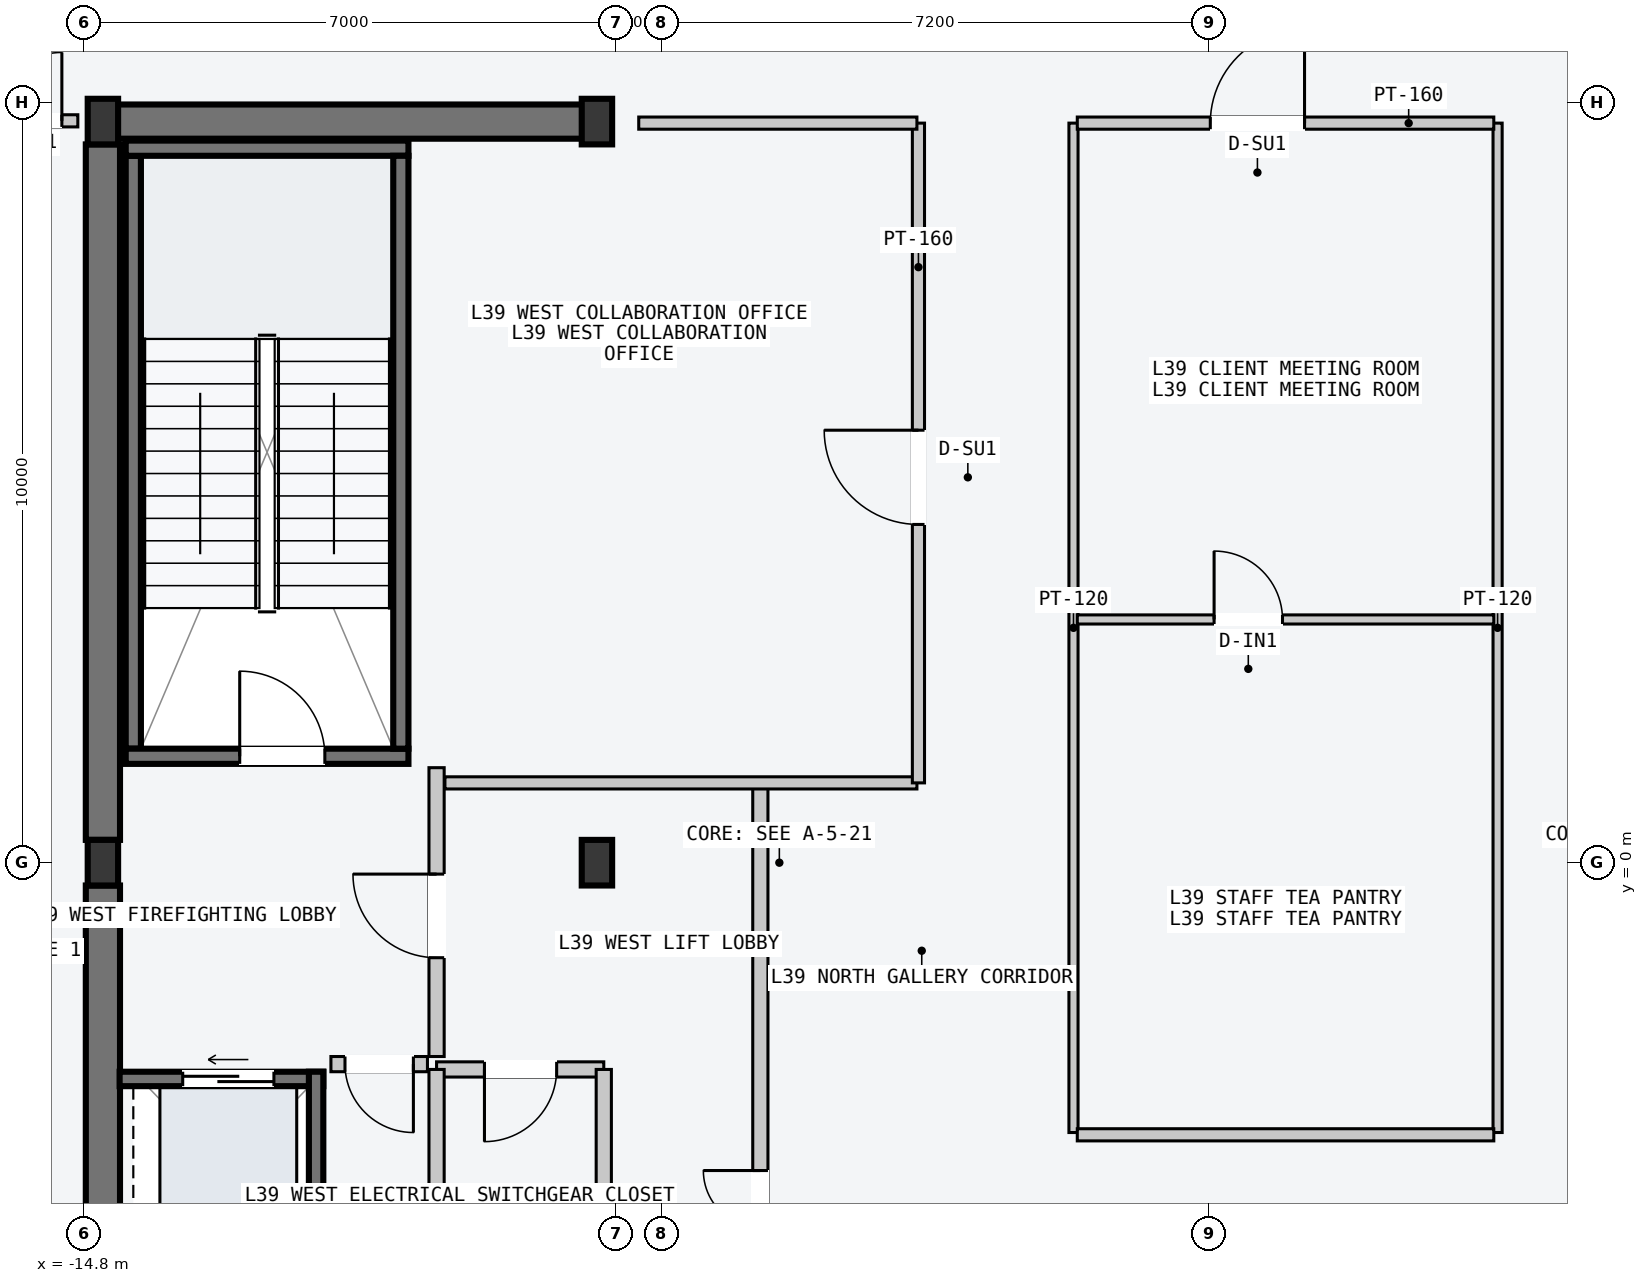
"""IFC4 building model, lengths in metres.
Left out: names, types, materials, properties, quantities, classifications, styles, units other than length and angle.
Written with IfcOpenShell. Run it as: python <this file> out.ifc"""

import sys

from ifc_helpers import new_model, si_unit, direction, frame, frame_2d, origin, origin_2d, place, context, subcontext, project, spatial, rectangle, i_section, extrude, element, fill, save


model = new_model("IFC4")
c1 = context("Model", 3, precision=1e-05, world=origin(), true_north=direction((0.0, 1.0)))
c2 = subcontext(c1, "Body", "Model", "MODEL_VIEW")
j1 = project(units=[si_unit("LENGTHUNIT", "METRE"), si_unit("PLANEANGLEUNIT", "RADIAN")], contexts=[c1])
p1 = place(None, origin())
s1 = spatial("IfcSite", under=j1, at=p1, CompositionType="ELEMENT")
p2 = place(p1, origin())
s2 = spatial("IfcBuilding", under=s1, at=p2, CompositionType="ELEMENT")
p3 = place(p2, frame((0.0, 0.0, 150.6)))
s3 = spatial("IfcBuildingStorey", under=s2, at=p3, CompositionType="ELEMENT", Elevation=150.6)
p4 = place(p3, frame((-14.53, 9.75, -0.2), z_axis=(0.0, 0.0, 1.0), x_axis=(1.0, 0.0, 0.0)))
e1 = element("IfcWall", 1, at=p4, inside=s3, PredefinedType="SHEAR", context=c2, shape_type="SweptSolid", body=[
    extrude(rectangle(XDim=6.46, YDim=0.45, at=frame_2d((3.23, 0.0))), origin(), (0.0, 0.0, 1.0), 4.5),
])
for number, where, z_axis, x_axis in (
    (2, (-14.55, -9.45, -0.2), (0.0, 0.0, 1.0), (0.0, 1.0, 0.0)),
    (3, (-14.55, 0.3, -0.2), (0.0, 0.0, 1.0), (0.0, 1.0, 0.0)),
):
    element("IfcWall", number, at=place(p3, frame(where, z_axis=z_axis, x_axis=x_axis)), inside=s3, PredefinedType="SHEAR", context=c2, shape_type="SweptSolid", body=[
        extrude(rectangle(XDim=9.15, YDim=0.45, at=frame_2d((4.575, 0.0))), origin(), (0.0, 0.0, 1.0), 4.5),
    ])
p5 = place(p3, frame((-14.15, 1.5, -0.2), z_axis=(0.0, 0.0, 1.0), x_axis=(0.0, 1.0, 0.0)))
e4 = element("IfcWall", 4, at=p5, inside=s3, PredefinedType="SOLIDWALL", context=c2, shape_type="SweptSolid", body=[
    extrude(rectangle(XDim=7.8, YDim=0.2, at=frame_2d((3.9, 0.0))), origin(), (0.0, 0.0, 1.0), 4.5),
])
p6 = place(p3, frame((-14.25, 1.4, -0.2), z_axis=(0.0, 0.0, 1.0), x_axis=(1.0, 0.0, 0.0)))
e5 = element("IfcWall", 5, at=p6, inside=s3, PredefinedType="SOLIDWALL", context=c2, shape_type="SweptSolid", body=[
    extrude(rectangle(XDim=3.72, YDim=0.2, at=frame_2d((1.86, 0.0))), origin(), (0.0, 0.0, 1.0), 4.5),
])
p7 = place(p6, frame((1.5, 0.0, 0.2)))
e6 = element("IfcOpeningElement", 6, at=p7, cuts=e5, PredefinedType="OPENING", context=c2, shape_type="SweptSolid", body=[
    extrude(rectangle(XDim=1.12, YDim=2.18, at=frame_2d((0.56, 1.09))), frame((0.0, 0.11, 0.0), z_axis=(0.0, -1.0, 0.0), x_axis=(1.0, 0.0, 0.0)), (0.0, 0.0, 1.0), 0.22),
])
p8 = place(p3, frame((-14.25, 9.4, -0.2), z_axis=(0.0, 0.0, 1.0), x_axis=(1.0, 0.0, 0.0)))
e7 = element("IfcWall", 7, at=p8, inside=s3, PredefinedType="SOLIDWALL", context=c2, shape_type="SweptSolid", body=[
    extrude(rectangle(XDim=3.72, YDim=0.2, at=frame_2d((1.86, 0.0))), origin(), (0.0, 0.0, 1.0), 4.5),
])
p9 = place(p3, frame((-10.63, 1.5, -0.2), z_axis=(0.0, 0.0, 1.0), x_axis=(0.0, 1.0, 0.0)))
e8 = element("IfcWall", 8, at=p9, inside=s3, PredefinedType="SOLIDWALL", context=c2, shape_type="SweptSolid", body=[
    extrude(rectangle(XDim=7.8, YDim=0.2, at=frame_2d((3.9, 0.0))), origin(), (0.0, 0.0, 1.0), 4.5),
])
for number, where, z_axis, x_axis in (
    (9, (-14.55, 0.0, 0.0), (0.0, 0.0, 1.0), (1.0, 0.0, 0.0)),
    (10, (-14.55, 9.75, 0.0), (0.0, 0.0, 1.0), (1.0, 0.0, 0.0)),
    (11, (-8.05, 0.0, 0.0), (0.0, 0.0, 1.0), (1.0, 0.0, 0.0)),
    (12, (-8.05, 9.75, 0.0), (0.0, 0.0, 1.0), (1.0, 0.0, 0.0)),
):
    element("IfcColumn", number, at=place(p3, frame(where, z_axis=z_axis, x_axis=x_axis)), inside=s3, PredefinedType="COLUMN", context=c2, shape_type="SweptSolid", body=[
        extrude(i_section(OverallWidth=0.4, OverallDepth=0.6, WebThickness=0.022, FlangeThickness=0.036, at=origin_2d()), origin(), (0.0, 0.0, 1.0), 4.5),
    ])
p10 = place(p3, frame((-14.33, -2.845, -0.2), z_axis=(0.0, 0.0, 1.0), x_axis=(1.0, 0.0, 0.0)))
e13 = element("IfcWall", 13, at=p10, inside=s3, PredefinedType="SOLIDWALL", context=c2, shape_type="SweptSolid", body=[
    extrude(rectangle(XDim=2.68, YDim=0.19, at=frame_2d((1.34, 0.0))), origin(), (0.0, 0.0, 1.0), 4.5),
])
p11 = place(p10, frame((0.83, 0.0, 0.2)))
e14 = element("IfcOpeningElement", 14, at=p11, cuts=e13, PredefinedType="OPENING", context=c2, shape_type="SweptSolid", body=[
    extrude(rectangle(XDim=1.2, YDim=2.2, at=frame_2d((0.6, 1.1))), frame((0.0, 0.105, 0.0), z_axis=(0.0, -1.0, 0.0), x_axis=(1.0, 0.0, 0.0)), (0.0, 0.0, 1.0), 0.21),
])
p12 = place(p3, frame((-11.745, -5.35, -0.2), z_axis=(0.0, 0.0, 1.0), x_axis=(0.0, 1.0, 0.0)))
e15 = element("IfcWall", 15, at=p12, inside=s3, PredefinedType="SOLIDWALL", context=c2, shape_type="SweptSolid", body=[
    extrude(rectangle(XDim=2.6, YDim=0.19, at=frame_2d((1.3, 0.0))), origin(), (0.0, 0.0, 1.0), 4.5),
])
p13 = place(p3, frame((-5.9, -9.45, 0.0), z_axis=(0.0, 0.0, 1.0), x_axis=(0.0, 1.0, 0.0)))
e16 = element("IfcWall", 16, at=p13, inside=s3, PredefinedType="PARTITIONING", context=c2, shape_type="SweptSolid", body=[
    extrude(rectangle(XDim=10.5, YDim=0.2, at=frame_2d((5.25, 0.0))), origin(), (0.0, 0.0, 1.0), 4.3),
])
p14 = place(p13, frame((3.9, 0.0, 0.0)))
e17 = element("IfcOpeningElement", 17, at=p14, cuts=e16, PredefinedType="OPENING", context=c2, shape_type="SweptSolid", body=[
    extrude(rectangle(XDim=1.5, YDim=2.2, at=frame_2d((0.75, 1.1))), frame((0.0, 0.11, 0.0), z_axis=(0.0, -1.0, 0.0), x_axis=(1.0, 0.0, 0.0)), (0.0, 0.0, 1.0), 0.22),
])
p15 = place(p3, frame((-10.16, -2.55, 0.0), z_axis=(0.0, 0.0, 1.0), x_axis=(0.0, 1.0, 0.0)))
e18 = element("IfcWall", 18, at=p15, inside=s3, PredefinedType="PARTITIONING", context=c2, shape_type="SweptSolid", body=[
    extrude(rectangle(XDim=3.8, YDim=0.2, at=frame_2d((1.9, 0.0))), origin(), (0.0, 0.0, 1.0), 4.3),
])
p16 = place(p15, frame((1.3, 0.0, 0.0)))
e19 = element("IfcOpeningElement", 19, at=p16, cuts=e18, PredefinedType="OPENING", context=c2, shape_type="SweptSolid", body=[
    extrude(rectangle(XDim=1.1, YDim=2.15, at=frame_2d((0.55, 1.075))), frame((0.0, 0.11, 0.0), z_axis=(0.0, -1.0, 0.0), x_axis=(1.0, 0.0, 0.0)), (0.0, 0.0, 1.0), 0.22),
])
p17 = place(p3, frame((-10.28, -2.65, 0.0), z_axis=(0.0, 0.0, 1.0), x_axis=(-1.0, 0.0, 0.0)))
e20 = element("IfcWall", 20, at=p17, inside=s3, PredefinedType="PARTITIONING", context=c2, shape_type="SweptSolid", body=[
    extrude(rectangle(XDim=1.27, YDim=0.2, at=frame_2d((0.635, 0.0))), origin(), (0.0, 0.0, 1.0), 4.3),
])
p18 = place(p17, frame((0.185, 0.0, 0.0)))
e21 = element("IfcOpeningElement", 21, at=p18, cuts=e20, PredefinedType="OPENING", context=c2, shape_type="SweptSolid", body=[
    extrude(rectangle(XDim=0.9, YDim=2.15, at=frame_2d((0.45, 1.075))), frame((0.0, 0.11, 0.0), z_axis=(0.0, -1.0, 0.0), x_axis=(1.0, 0.0, 0.0)), (0.0, 0.0, 1.0), 0.22),
])
p19 = place(p3, frame((-7.96, -2.72, 0.0), z_axis=(0.0, 0.0, 1.0), x_axis=(-1.0, 0.0, 0.0)))
e22 = element("IfcWall", 22, at=p19, inside=s3, PredefinedType="PARTITIONING", context=c2, shape_type="SweptSolid", body=[
    extrude(rectangle(XDim=2.2, YDim=0.2, at=frame_2d((1.1, 0.0))), origin(), (0.0, 0.0, 1.0), 4.3),
])
p20 = place(p19, frame((0.62, 0.0, 0.0)))
e23 = element("IfcOpeningElement", 23, at=p20, cuts=e22, PredefinedType="OPENING", context=c2, shape_type="SweptSolid", body=[
    extrude(rectangle(XDim=0.95, YDim=2.1, at=frame_2d((0.475, 1.05))), frame((0.0, 0.11, 0.0), z_axis=(0.0, -1.0, 0.0), x_axis=(1.0, 0.0, 0.0)), (0.0, 0.0, 1.0), 0.22),
])
for number, where, z_axis, x_axis in (
    (24, (-7.96, -5.16, 0.0), (0.0, 0.0, 1.0), (0.0, 1.0, 0.0)),
    (25, (-10.16, -5.16, 0.0), (0.0, 0.0, 1.0), (0.0, 1.0, 0.0)),
):
    element("IfcWall", number, at=place(p3, frame(where, z_axis=z_axis, x_axis=x_axis)), inside=s3, PredefinedType="PARTITIONING", context=c2, shape_type="SweptSolid", body=[
        extrude(rectangle(XDim=2.44, YDim=0.2, at=frame_2d((1.22, 0.0))), origin(), (0.0, 0.0, 1.0), 4.3),
    ])
p21 = place(p3, frame((-10.05, 1.05, 0.0), z_axis=(0.0, 0.0, 1.0), x_axis=(1.0, 0.0, 0.0)))
e26 = element("IfcWall", 26, at=p21, inside=s3, PredefinedType="PARTITIONING", context=c2, shape_type="SweptSolid", body=[
    extrude(rectangle(XDim=6.21, YDim=0.16, at=frame_2d((3.105, 0.0))), origin(), (0.0, 0.0, 1.0), 4.3),
])
p22 = place(p3, frame((-3.82, 1.05, 0.0), z_axis=(0.0, 0.0, 1.0), x_axis=(0.0, 1.0, 0.0)))
e27 = element("IfcWall", 27, at=p22, inside=s3, PredefinedType="PARTITIONING", context=c2, shape_type="SweptSolid", body=[
    extrude(rectangle(XDim=8.68, YDim=0.16, at=frame_2d((4.34, 0.0))), origin(), (0.0, 0.0, 1.0), 4.3),
])
p23 = place(p22, frame((3.4, 0.0, 0.0)))
e28 = element("IfcOpeningElement", 28, at=p23, cuts=e27, PredefinedType="OPENING", context=c2, shape_type="SweptSolid", body=[
    extrude(rectangle(XDim=1.24, YDim=2.24, at=frame_2d((0.62, 1.12))), frame((0.0, 0.09, 0.0), z_axis=(0.0, -1.0, 0.0), x_axis=(1.0, 0.0, 0.0)), (0.0, 0.0, 1.0), 0.18),
])
p24 = place(p3, frame((-7.5, 9.73, 0.0), z_axis=(0.0, 0.0, 1.0), x_axis=(1.0, 0.0, 0.0)))
e29 = element("IfcWall", 29, at=p24, inside=s3, PredefinedType="PARTITIONING", context=c2, shape_type="SweptSolid", body=[
    extrude(rectangle(XDim=3.66, YDim=0.16, at=frame_2d((1.83, 0.0))), origin(), (0.0, 0.0, 1.0), 3.6),
])
for number, where, z_axis, x_axis in (
    (30, (-1.78, -3.55, 0.0), (0.0, 0.0, 1.0), (0.0, 1.0, 0.0)),
    (31, (3.8, -3.55, 0.0), (0.0, 0.0, 1.0), (0.0, 1.0, 0.0)),
):
    element("IfcWall", number, at=place(p3, frame(where, z_axis=z_axis, x_axis=x_axis)), inside=s3, PredefinedType="PARTITIONING", context=c2, shape_type="SweptSolid", body=[
        extrude(rectangle(XDim=13.28, YDim=0.12, at=frame_2d((6.64, 0.0))), origin(), (0.0, 0.0, 1.0), 4.3),
    ])
p25 = place(p3, frame((-1.73, -3.58, 0.0), z_axis=(0.0, 0.0, 1.0), x_axis=(1.0, 0.0, 0.0)))
e32 = element("IfcWall", 32, at=p25, inside=s3, PredefinedType="PARTITIONING", context=c2, shape_type="SweptSolid", body=[
    extrude(rectangle(XDim=5.48, YDim=0.16, at=frame_2d((2.74, 0.0))), origin(), (0.0, 0.0, 1.0), 4.3),
])
p26 = place(p3, frame((-1.73, 3.2, 0.0), z_axis=(0.0, 0.0, 1.0), x_axis=(1.0, 0.0, 0.0)))
e33 = element("IfcWall", 33, at=p26, inside=s3, PredefinedType="PARTITIONING", context=c2, shape_type="SweptSolid", body=[
    extrude(rectangle(XDim=5.48, YDim=0.12, at=frame_2d((2.74, 0.0))), origin(), (0.0, 0.0, 1.0), 4.3),
])
p27 = place(p26, frame((1.8, 0.0, 0.0)))
e34 = element("IfcOpeningElement", 34, at=p27, cuts=e33, PredefinedType="OPENING", context=c2, shape_type="SweptSolid", body=[
    extrude(rectangle(XDim=0.9, YDim=2.15, at=frame_2d((0.45, 1.075))), frame((0.0, 0.07, 0.0), z_axis=(0.0, -1.0, 0.0), x_axis=(1.0, 0.0, 0.0)), (0.0, 0.0, 1.0), 0.14),
])
p28 = place(p3, frame((-1.73, 9.73, 0.0), z_axis=(0.0, 0.0, 1.0), x_axis=(1.0, 0.0, 0.0)))
e35 = element("IfcWall", 35, at=p28, inside=s3, PredefinedType="PARTITIONING", context=c2, shape_type="SweptSolid", body=[
    extrude(rectangle(XDim=5.48, YDim=0.16, at=frame_2d((2.74, 0.0))), origin(), (0.0, 0.0, 1.0), 3.6),
])
p29 = place(p28, frame((1.75, 0.0, 0.0)))
e36 = element("IfcOpeningElement", 36, at=p29, cuts=e35, PredefinedType="OPENING", context=c2, shape_type="SweptSolid", body=[
    extrude(rectangle(XDim=1.24, YDim=2.24, at=frame_2d((0.62, 1.12))), frame((0.0, 0.09, 0.0), z_axis=(0.0, -1.0, 0.0), x_axis=(1.0, 0.0, 0.0)), (0.0, 0.0, 1.0), 0.18),
])
p30 = place(p3, frame((-16.2, 9.76, 0.0), z_axis=(0.0, 0.0, 1.0), x_axis=(1.0, 0.0, 0.0)))
e37 = element("IfcWall", 37, at=p30, inside=s3, PredefinedType="PARTITIONING", context=c2, shape_type="SweptSolid", body=[
    extrude(rectangle(XDim=1.32, YDim=0.16, at=frame_2d((0.66, 0.0))), origin(), (0.0, 0.0, 1.0), 3.6),
])
p31 = place(p30, frame((0.21, 0.0, 0.0)))
e38 = element("IfcOpeningElement", 38, at=p31, cuts=e37, PredefinedType="OPENING", context=c2, shape_type="SweptSolid", body=[
    extrude(rectangle(XDim=0.9, YDim=2.15, at=frame_2d((0.45, 1.075))), frame((0.0, 0.09, 0.0), z_axis=(0.0, -1.0, 0.0), x_axis=(1.0, 0.0, 0.0)), (0.0, 0.0, 1.0), 0.18),
])
p32 = place(p7, origin())
e39 = element("IfcDoor", 39, at=p32, inside=s3, OperationType="SINGLE_SWING_LEFT", PredefinedType="DOOR", context=c2, shape_type="SweptSolid", body=[
    extrude(rectangle(XDim=1.12, YDim=2.18, at=frame_2d((0.56, 1.09))), frame((0.0, 0.025, 0.0), z_axis=(0.0, -1.0, 0.0), x_axis=(1.0, 0.0, 0.0)), (0.0, 0.0, 1.0), 0.05),
])
fill(e6, e39)
p33 = place(p11, origin())
e40 = element("IfcDoor", 40, at=p33, inside=s3, OperationType="SLIDING_TO_LEFT", PredefinedType="DOOR", context=c2, shape_type="SweptSolid", body=[
    extrude(rectangle(XDim=1.2, YDim=2.2, at=frame_2d((0.6, 1.1))), frame((0.0, 0.025, 0.0), z_axis=(0.0, -1.0, 0.0), x_axis=(1.0, 0.0, 0.0)), (0.0, 0.0, 1.0), 0.05),
])
fill(e14, e40)
p34 = place(p14, origin())
e41 = element("IfcDoor", 41, at=p34, inside=s3, OperationType="DOUBLE_DOOR_SINGLE_SWING", PredefinedType="DOOR", context=c2, shape_type="SweptSolid", body=[
    extrude(rectangle(XDim=1.5, YDim=2.2, at=frame_2d((0.75, 1.1))), frame((0.0, 0.025, 0.0), z_axis=(0.0, -1.0, 0.0), x_axis=(1.0, 0.0, 0.0)), (0.0, 0.0, 1.0), 0.05),
])
fill(e17, e41)
p35 = place(p16, origin())
e42 = element("IfcDoor", 42, at=p35, inside=s3, OperationType="SINGLE_SWING_RIGHT", PredefinedType="DOOR", context=c2, shape_type="SweptSolid", body=[
    extrude(rectangle(XDim=1.1, YDim=2.15, at=frame_2d((0.55, 1.075))), frame((0.0, 0.025, 0.0), z_axis=(0.0, -1.0, 0.0), x_axis=(1.0, 0.0, 0.0)), (0.0, 0.0, 1.0), 0.05),
])
fill(e19, e42)
p36 = place(p18, origin())
e43 = element("IfcDoor", 43, at=p36, inside=s3, OperationType="SINGLE_SWING_LEFT", PredefinedType="DOOR", context=c2, shape_type="SweptSolid", body=[
    extrude(rectangle(XDim=0.9, YDim=2.15, at=frame_2d((0.45, 1.075))), frame((0.0, 0.025, 0.0), z_axis=(0.0, -1.0, 0.0), x_axis=(1.0, 0.0, 0.0)), (0.0, 0.0, 1.0), 0.05),
])
fill(e21, e43)
p37 = place(p20, origin())
e44 = element("IfcDoor", 44, at=p37, inside=s3, OperationType="SINGLE_SWING_RIGHT", PredefinedType="DOOR", context=c2, shape_type="SweptSolid", body=[
    extrude(rectangle(XDim=0.95, YDim=2.1, at=frame_2d((0.475, 1.05))), frame((0.0, 0.025, 0.0), z_axis=(0.0, -1.0, 0.0), x_axis=(1.0, 0.0, 0.0)), (0.0, 0.0, 1.0), 0.05),
])
fill(e23, e44)
p38 = place(p23, origin())
e45 = element("IfcDoor", 45, at=p38, inside=s3, OperationType="SINGLE_SWING_RIGHT", PredefinedType="DOOR", context=c2, shape_type="SweptSolid", body=[
    extrude(rectangle(XDim=1.24, YDim=2.24, at=frame_2d((0.62, 1.12))), frame((0.0, 0.025, 0.0), z_axis=(0.0, -1.0, 0.0), x_axis=(1.0, 0.0, 0.0)), (0.0, 0.0, 1.0), 0.05),
])
fill(e28, e45)
p39 = place(p27, origin())
e46 = element("IfcDoor", 46, at=p39, inside=s3, OperationType="SINGLE_SWING_LEFT", PredefinedType="DOOR", context=c2, shape_type="SweptSolid", body=[
    extrude(rectangle(XDim=0.9, YDim=2.15, at=frame_2d((0.45, 1.075))), frame((0.0, 0.025, 0.0), z_axis=(0.0, -1.0, 0.0), x_axis=(1.0, 0.0, 0.0)), (0.0, 0.0, 1.0), 0.05),
])
fill(e34, e46)
p40 = place(p29, origin())
e47 = element("IfcDoor", 47, at=p40, inside=s3, OperationType="SINGLE_SWING_RIGHT", PredefinedType="DOOR", context=c2, shape_type="SweptSolid", body=[
    extrude(rectangle(XDim=1.24, YDim=2.24, at=frame_2d((0.62, 1.12))), frame((0.0, 0.025, 0.0), z_axis=(0.0, -1.0, 0.0), x_axis=(1.0, 0.0, 0.0)), (0.0, 0.0, 1.0), 0.05),
])
fill(e36, e47)
p41 = place(p31, origin())
e48 = element("IfcDoor", 48, at=p41, inside=s3, OperationType="SINGLE_SWING_RIGHT", PredefinedType="DOOR", context=c2, shape_type="SweptSolid", body=[
    extrude(rectangle(XDim=0.9, YDim=2.15, at=frame_2d((0.45, 1.075))), frame((0.0, 0.025, 0.0), z_axis=(0.0, -1.0, 0.0), x_axis=(1.0, 0.0, 0.0)), (0.0, 0.0, 1.0), 0.05),
])
fill(e38, e48)
save(model, sys.argv[1])
